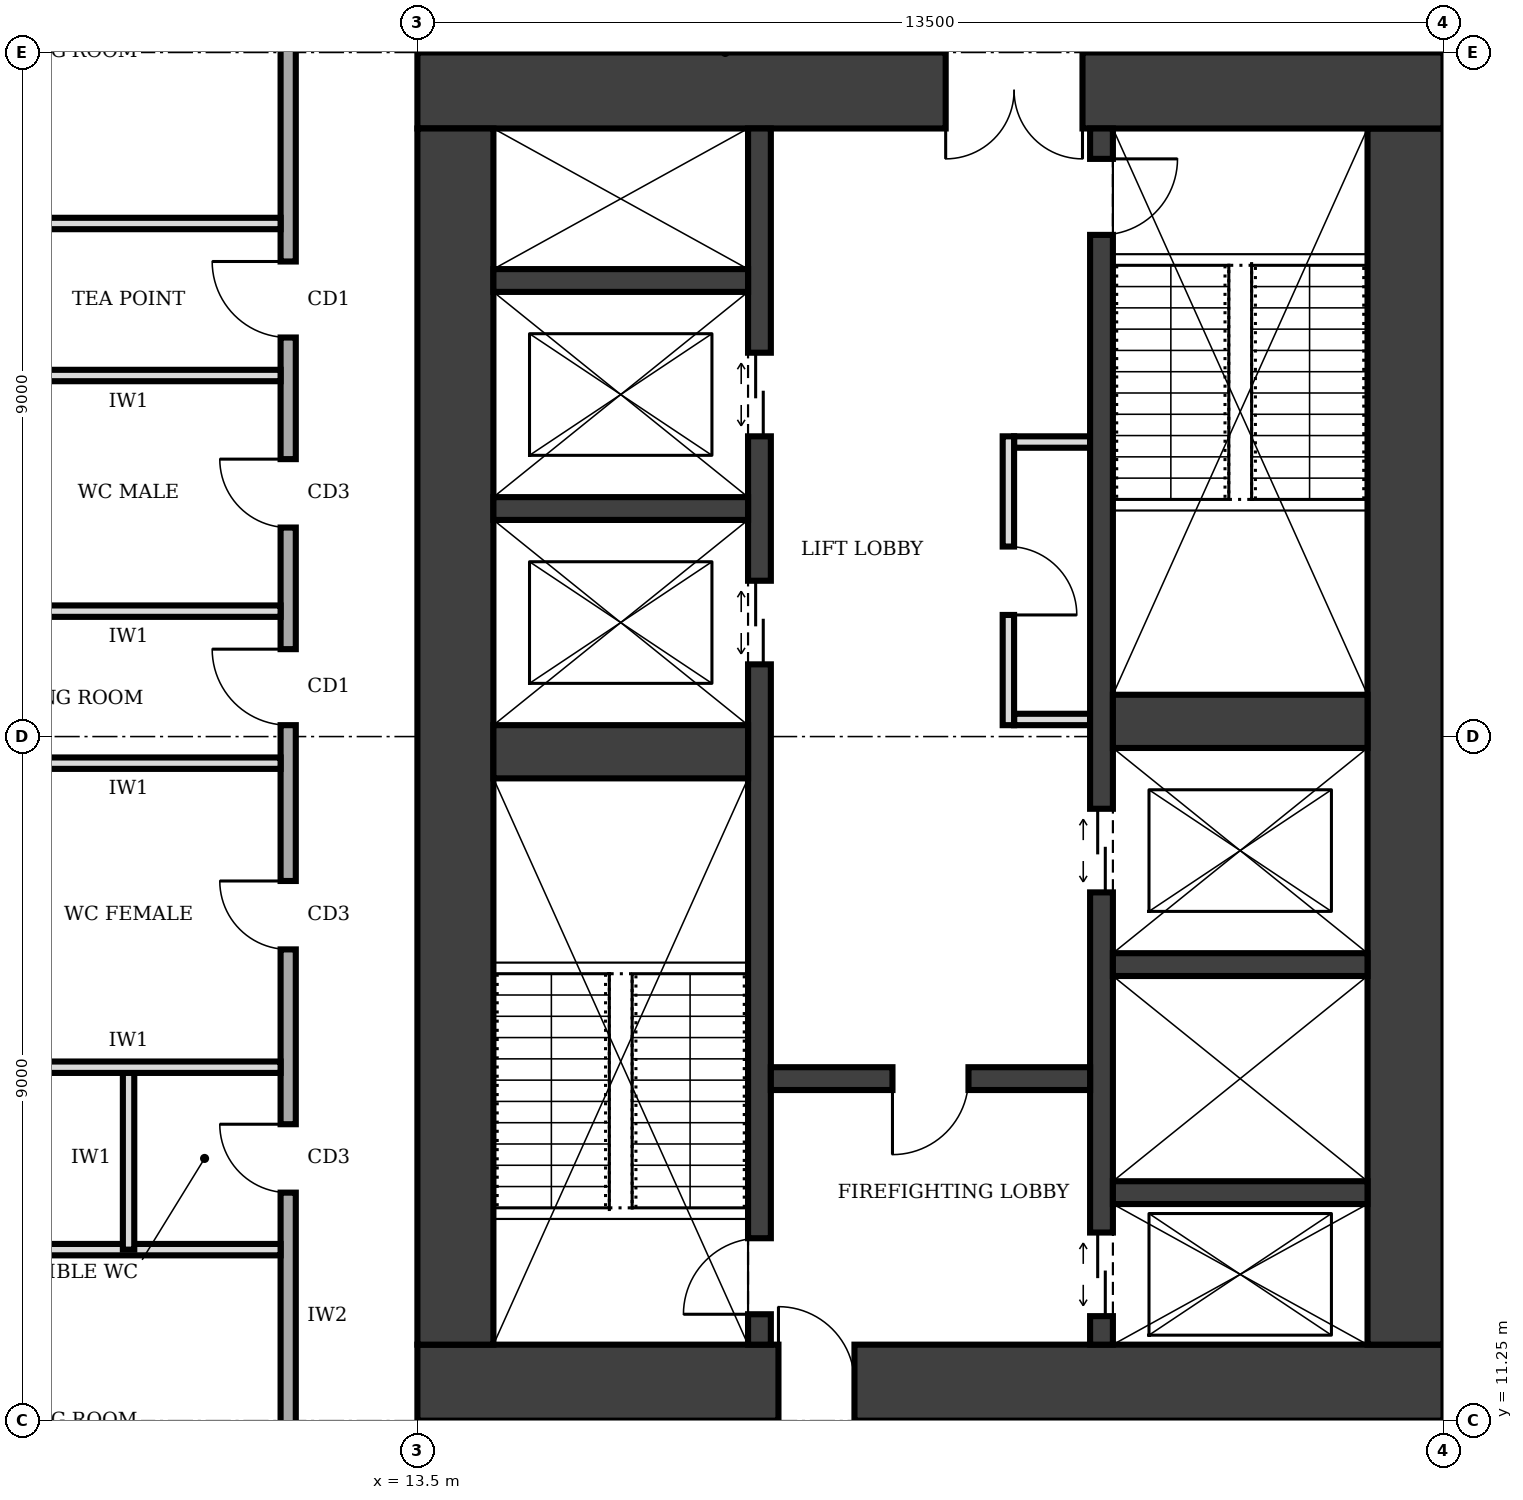
"""IFC4 building model, lengths in metres.
Left out: names, types, materials, properties, quantities, classifications, styles, units other than length and angle.
Written with IfcOpenShell. Run it as: python <this file> out.ifc"""

import sys

from ifc_helpers import new_model, si_unit, direction, frame, frame_2d, origin, place, context, subcontext, project, spatial, rectangle, extrude, element, fill, save


model = new_model("IFC4")
c1 = context("Model", 3, precision=1e-05, world=origin(), true_north=direction((0.0, 1.0)))
c2 = subcontext(c1, "Body", "Model", "MODEL_VIEW")
j1 = project(units=[si_unit("LENGTHUNIT", "METRE"), si_unit("PLANEANGLEUNIT", "RADIAN")], contexts=[c1])
p1 = place(None, origin())
s1 = spatial("IfcSite", under=j1, at=p1, CompositionType="ELEMENT")
p2 = place(p1, origin())
s2 = spatial("IfcBuilding", under=s1, at=p2, CompositionType="ELEMENT")
p3 = place(p2, frame((0.0, 0.0, 73.0)))
s3 = spatial("IfcBuildingStorey", under=s2, at=p3, CompositionType="ELEMENT", Elevation=73.0)
p4 = place(p3, frame((13.5, 11.75, 0.0), z_axis=(0.0, 0.0, 1.0), x_axis=(1.0, 0.0, 0.0)))
e1 = element("IfcWall", 1, at=p4, inside=s3, PredefinedType="SHEAR", context=c2, shape_type="SweptSolid", body=[
    extrude(rectangle(XDim=13.5, YDim=1.0, at=frame_2d((6.75, 0.0))), origin(), (0.0, 0.0, 1.0), 4.0),
])
p5 = place(p4, frame((4.75, 0.0, 0.0)))
e2 = element("IfcOpeningElement", 2, at=p5, cuts=e1, PredefinedType="OPENING", context=c2, shape_type="SweptSolid", body=[
    extrude(rectangle(XDim=1.0, YDim=2.1, at=frame_2d((0.5, 1.05))), frame((0.0, 0.51, 0.0), z_axis=(0.0, -1.0, 0.0), x_axis=(1.0, 0.0, 0.0)), (0.0, 0.0, 1.0), 1.02),
])
p6 = place(p3, frame((26.5, 12.25, 0.0), z_axis=(0.0, 0.0, 1.0), x_axis=(0.0, 1.0, 0.0)))
e3 = element("IfcWall", 3, at=p6, inside=s3, PredefinedType="SHEAR", context=c2, shape_type="SweptSolid", body=[
    extrude(rectangle(XDim=16.0, YDim=1.0, at=frame_2d((8.0, 0.0))), origin(), (0.0, 0.0, 1.0), 4.0),
])
p7 = place(p3, frame((27.0, 28.75, 0.0), z_axis=(0.0, 0.0, 1.0), x_axis=(-1.0, 0.0, 0.0)))
e4 = element("IfcWall", 4, at=p7, inside=s3, PredefinedType="SHEAR", context=c2, shape_type="SweptSolid", body=[
    extrude(rectangle(XDim=13.5, YDim=1.0, at=frame_2d((6.75, 0.0))), origin(), (0.0, 0.0, 1.0), 4.0),
])
p8 = place(p7, frame((4.75, 0.0, 0.0)))
e5 = element("IfcOpeningElement", 5, at=p8, cuts=e4, PredefinedType="OPENING", context=c2, shape_type="SweptSolid", body=[
    extrude(rectangle(XDim=1.8, YDim=2.1, at=frame_2d((0.9, 1.05))), frame((0.0, 0.51, 0.0), z_axis=(0.0, -1.0, 0.0), x_axis=(1.0, 0.0, 0.0)), (0.0, 0.0, 1.0), 1.02),
])
p9 = place(p3, frame((14.0, 28.25, 0.0), z_axis=(0.0, 0.0, 1.0), x_axis=(0.0, -1.0, 0.0)))
e6 = element("IfcWall", 6, at=p9, inside=s3, PredefinedType="SHEAR", context=c2, shape_type="SweptSolid", body=[
    extrude(rectangle(XDim=16.0, YDim=1.0, at=frame_2d((8.0, 0.0))), origin(), (0.0, 0.0, 1.0), 4.0),
])
p10 = place(p3, frame((18.0, 12.25, 0.0), z_axis=(0.0, 0.0, 1.0), x_axis=(0.0, 1.0, 0.0)))
e7 = element("IfcWall", 7, at=p10, inside=s3, PredefinedType="SHEAR", context=c2, shape_type="SweptSolid", body=[
    extrude(rectangle(XDim=16.0, YDim=0.3, at=frame_2d((8.0, 0.0))), origin(), (0.0, 0.0, 1.0), 4.0),
])
p11 = place(p10, frame((0.4, 0.0, 0.0)))
e8 = element("IfcOpeningElement", 8, at=p11, cuts=e7, PredefinedType="OPENING", context=c2, shape_type="SweptSolid", body=[
    extrude(rectangle(XDim=1.0, YDim=2.1, at=frame_2d((0.5, 1.05))), frame((0.0, 0.16, 0.0), z_axis=(0.0, -1.0, 0.0), x_axis=(1.0, 0.0, 0.0)), (0.0, 0.0, 1.0), 0.32),
])
p12 = place(p10, frame((8.95, 0.0, 0.0)))
e9 = element("IfcOpeningElement", 9, at=p12, cuts=e7, PredefinedType="OPENING", context=c2, shape_type="SweptSolid", body=[
    extrude(rectangle(XDim=1.1, YDim=2.1, at=frame_2d((0.55, 1.05))), frame((0.0, 0.16, 0.0), z_axis=(0.0, -1.0, 0.0), x_axis=(1.0, 0.0, 0.0)), (0.0, 0.0, 1.0), 0.32),
])
p13 = place(p10, frame((11.95, 0.0, 0.0)))
e10 = element("IfcOpeningElement", 10, at=p13, cuts=e7, PredefinedType="OPENING", context=c2, shape_type="SweptSolid", body=[
    extrude(rectangle(XDim=1.1, YDim=2.1, at=frame_2d((0.55, 1.05))), frame((0.0, 0.16, 0.0), z_axis=(0.0, -1.0, 0.0), x_axis=(1.0, 0.0, 0.0)), (0.0, 0.0, 1.0), 0.32),
])
p14 = place(p3, frame((22.5, 12.25, 0.0), z_axis=(0.0, 0.0, 1.0), x_axis=(0.0, 1.0, 0.0)))
e11 = element("IfcWall", 11, at=p14, inside=s3, PredefinedType="SHEAR", context=c2, shape_type="SweptSolid", body=[
    extrude(rectangle(XDim=16.0, YDim=0.3, at=frame_2d((8.0, 0.0))), origin(), (0.0, 0.0, 1.0), 4.0),
])
p15 = place(p14, frame((14.6, 0.0, 0.0)))
e12 = element("IfcOpeningElement", 12, at=p15, cuts=e11, PredefinedType="OPENING", context=c2, shape_type="SweptSolid", body=[
    extrude(rectangle(XDim=1.0, YDim=2.1, at=frame_2d((0.5, 1.05))), frame((0.0, 0.16, 0.0), z_axis=(0.0, -1.0, 0.0), x_axis=(1.0, 0.0, 0.0)), (0.0, 0.0, 1.0), 0.32),
])
p16 = place(p14, frame((0.375, 0.0, 0.0)))
e13 = element("IfcOpeningElement", 13, at=p16, cuts=e11, PredefinedType="OPENING", context=c2, shape_type="SweptSolid", body=[
    extrude(rectangle(XDim=1.1, YDim=2.1, at=frame_2d((0.55, 1.05))), frame((0.0, 0.16, 0.0), z_axis=(0.0, -1.0, 0.0), x_axis=(1.0, 0.0, 0.0)), (0.0, 0.0, 1.0), 0.32),
])
p17 = place(p14, frame((5.95, 0.0, 0.0)))
e14 = element("IfcOpeningElement", 14, at=p17, cuts=e11, PredefinedType="OPENING", context=c2, shape_type="SweptSolid", body=[
    extrude(rectangle(XDim=1.1, YDim=2.1, at=frame_2d((0.55, 1.05))), frame((0.0, 0.16, 0.0), z_axis=(0.0, -1.0, 0.0), x_axis=(1.0, 0.0, 0.0)), (0.0, 0.0, 1.0), 0.32),
])
p18 = place(p3, frame((14.5, 20.05, 0.0), z_axis=(0.0, 0.0, 1.0), x_axis=(1.0, 0.0, 0.0)))
e15 = element("IfcWall", 15, at=p18, inside=s3, PredefinedType="SHEAR", context=c2, shape_type="SweptSolid", body=[
    extrude(rectangle(XDim=3.35, YDim=0.7, at=frame_2d((1.675, 0.0))), origin(), (0.0, 0.0, 1.0), 4.0),
])
p19 = place(p3, frame((18.15, 15.75, 0.0), z_axis=(0.0, 0.0, 1.0), x_axis=(1.0, 0.0, 0.0)))
e16 = element("IfcWall", 16, at=p19, inside=s3, PredefinedType="SHEAR", context=c2, shape_type="SweptSolid", body=[
    extrude(rectangle(XDim=4.2, YDim=0.3, at=frame_2d((2.1, 0.0))), origin(), (0.0, 0.0, 1.0), 4.0),
])
p20 = place(p19, frame((1.6, 0.0, 0.0)))
e17 = element("IfcOpeningElement", 17, at=p20, cuts=e16, PredefinedType="OPENING", context=c2, shape_type="SweptSolid", body=[
    extrude(rectangle(XDim=1.0, YDim=2.1, at=frame_2d((0.5, 1.05))), frame((0.0, 0.16, 0.0), z_axis=(0.0, -1.0, 0.0), x_axis=(1.0, 0.0, 0.0)), (0.0, 0.0, 1.0), 0.32),
])
for number, where, z_axis, x_axis in (
    (18, (22.65, 14.25, 0.0), (0.0, 0.0, 1.0), (1.0, 0.0, 0.0)),
    (19, (22.65, 17.25, 0.0), (0.0, 0.0, 1.0), (1.0, 0.0, 0.0)),
):
    element("IfcWall", number, at=place(p3, frame(where, z_axis=z_axis, x_axis=x_axis)), inside=s3, PredefinedType="SHEAR", context=c2, shape_type="SweptSolid", body=[
        extrude(rectangle(XDim=3.35, YDim=0.3, at=frame_2d((1.675, 0.0))), origin(), (0.0, 0.0, 1.0), 4.0),
    ])
p21 = place(p3, frame((22.65, 20.45, 0.0), z_axis=(0.0, 0.0, 1.0), x_axis=(1.0, 0.0, 0.0)))
e20 = element("IfcWall", 20, at=p21, inside=s3, PredefinedType="SHEAR", context=c2, shape_type="SweptSolid", body=[
    extrude(rectangle(XDim=3.35, YDim=0.7, at=frame_2d((1.675, 0.0))), origin(), (0.0, 0.0, 1.0), 4.0),
])
for number, where, z_axis, x_axis in (
    (21, (14.5, 23.25, 0.0), (0.0, 0.0, 1.0), (1.0, 0.0, 0.0)),
    (22, (14.5, 26.25, 0.0), (0.0, 0.0, 1.0), (1.0, 0.0, 0.0)),
):
    element("IfcWall", number, at=place(p3, frame(where, z_axis=z_axis, x_axis=x_axis)), inside=s3, PredefinedType="SHEAR", context=c2, shape_type="SweptSolid", body=[
        extrude(rectangle(XDim=3.35, YDim=0.3, at=frame_2d((1.675, 0.0))), origin(), (0.0, 0.0, 1.0), 4.0),
    ])
p22 = place(p3, frame((21.275, 20.4, 0.0), z_axis=(0.0, 0.0, 1.0), x_axis=(0.0, 1.0, 0.0)))
e23 = element("IfcWall", 23, at=p22, inside=s3, PredefinedType="PARTITIONING", context=c2, shape_type="SweptSolid", body=[
    extrude(rectangle(XDim=3.8, YDim=0.15, at=frame_2d((1.9, 0.0))), origin(), (0.0, 0.0, 1.0), 3.75),
])
p23 = place(p22, frame((1.45, 0.0, 0.0)))
e24 = element("IfcOpeningElement", 24, at=p23, cuts=e23, PredefinedType="OPENING", context=c2, shape_type="SweptSolid", body=[
    extrude(rectangle(XDim=0.9, YDim=2.1, at=frame_2d((0.45, 1.05))), frame((0.0, 0.085, 0.0), z_axis=(0.0, -1.0, 0.0), x_axis=(1.0, 0.0, 0.0)), (0.0, 0.0, 1.0), 0.17),
])
for number, where, z_axis, x_axis in (
    (25, (21.35, 20.475, 0.0), (0.0, 0.0, 1.0), (1.0, 0.0, 0.0)),
    (26, (21.35, 24.125, 0.0), (0.0, 0.0, 1.0), (1.0, 0.0, 0.0)),
):
    element("IfcWall", number, at=place(p3, frame(where, z_axis=z_axis, x_axis=x_axis)), inside=s3, PredefinedType="PARTITIONING", context=c2, shape_type="SweptSolid", body=[
        extrude(rectangle(XDim=1.0, YDim=0.15, at=frame_2d((0.5, 0.0))), origin(), (0.0, 0.0, 1.0), 3.75),
    ])
p24 = place(p3, frame((11.8, 32.8, 0.0), z_axis=(0.0, 0.0, 1.0), x_axis=(0.0, -1.0, 0.0)))
e27 = element("IfcWall", 27, at=p24, inside=s3, PredefinedType="SOLIDWALL", context=c2, shape_type="SweptSolid", body=[
    extrude(rectangle(XDim=25.3, YDim=0.2, at=frame_2d((12.65, 0.0))), origin(), (0.0, 0.0, 1.0), 3.75),
])
p25 = place(p24, frame((21.8, 0.0, 0.0)))
e28 = element("IfcOpeningElement", 28, at=p25, cuts=e27, PredefinedType="OPENING", context=c2, shape_type="SweptSolid", body=[
    extrude(rectangle(XDim=1.0, YDim=2.1, at=frame_2d((0.5, 1.05))), frame((0.0, 0.11, 0.0), z_axis=(0.0, -1.0, 0.0), x_axis=(1.0, 0.0, 0.0)), (0.0, 0.0, 1.0), 0.22),
])
p26 = place(p24, frame((17.65, 0.0, 0.0)))
e29 = element("IfcOpeningElement", 29, at=p26, cuts=e27, PredefinedType="OPENING", context=c2, shape_type="SweptSolid", body=[
    extrude(rectangle(XDim=0.9, YDim=2.1, at=frame_2d((0.45, 1.05))), frame((0.0, 0.11, 0.0), z_axis=(0.0, -1.0, 0.0), x_axis=(1.0, 0.0, 0.0)), (0.0, 0.0, 1.0), 0.22),
])
p27 = place(p24, frame((14.45, 0.0, 0.0)))
e30 = element("IfcOpeningElement", 30, at=p27, cuts=e27, PredefinedType="OPENING", context=c2, shape_type="SweptSolid", body=[
    extrude(rectangle(XDim=0.9, YDim=2.1, at=frame_2d((0.45, 1.05))), frame((0.0, 0.11, 0.0), z_axis=(0.0, -1.0, 0.0), x_axis=(1.0, 0.0, 0.0)), (0.0, 0.0, 1.0), 0.22),
])
p28 = place(p24, frame((8.9, 0.0, 0.0)))
e31 = element("IfcOpeningElement", 31, at=p28, cuts=e27, PredefinedType="OPENING", context=c2, shape_type="SweptSolid", body=[
    extrude(rectangle(XDim=0.9, YDim=2.1, at=frame_2d((0.45, 1.05))), frame((0.0, 0.11, 0.0), z_axis=(0.0, -1.0, 0.0), x_axis=(1.0, 0.0, 0.0)), (0.0, 0.0, 1.0), 0.22),
])
p29 = place(p24, frame((6.3, 0.0, 0.0)))
e32 = element("IfcOpeningElement", 32, at=p29, cuts=e27, PredefinedType="OPENING", context=c2, shape_type="SweptSolid", body=[
    extrude(rectangle(XDim=1.0, YDim=2.1, at=frame_2d((0.5, 1.05))), frame((0.0, 0.11, 0.0), z_axis=(0.0, -1.0, 0.0), x_axis=(1.0, 0.0, 0.0)), (0.0, 0.0, 1.0), 0.22),
])
p30 = place(p24, frame((11.4, 0.0, 0.0)))
e33 = element("IfcOpeningElement", 33, at=p30, cuts=e27, PredefinedType="OPENING", context=c2, shape_type="SweptSolid", body=[
    extrude(rectangle(XDim=1.0, YDim=2.1, at=frame_2d((0.5, 1.05))), frame((0.0, 0.11, 0.0), z_axis=(0.0, -1.0, 0.0), x_axis=(1.0, 0.0, 0.0)), (0.0, 0.0, 1.0), 0.22),
])
p31 = place(p24, frame((2.3, 0.0, 0.0)))
e34 = element("IfcOpeningElement", 34, at=p31, cuts=e27, PredefinedType="OPENING", context=c2, shape_type="SweptSolid", body=[
    extrude(rectangle(XDim=1.0, YDim=2.1, at=frame_2d((0.5, 1.05))), frame((0.0, 0.11, 0.0), z_axis=(0.0, -1.0, 0.0), x_axis=(1.0, 0.0, 0.0)), (0.0, 0.0, 1.0), 0.22),
])
for number, where, z_axis, x_axis in (
    (35, (0.3, 13.5, 0.0), (0.0, 0.0, 1.0), (1.0, 0.0, 0.0)),
    (36, (0.3, 27.0, 0.0), (0.0, 0.0, 1.0), (1.0, 0.0, 0.0)),
):
    element("IfcWall", number, at=place(p3, frame(where, z_axis=z_axis, x_axis=x_axis)), inside=s3, PredefinedType="PARTITIONING", context=c2, shape_type="SweptSolid", body=[
        extrude(rectangle(XDim=11.4, YDim=0.15, at=frame_2d((5.7, 0.0))), origin(), (0.0, 0.0, 1.0), 3.75),
    ])
for number, where, z_axis, x_axis in (
    (37, (11.7, 15.9, 0.0), (0.0, 0.0, 1.0), (-1.0, 0.0, 0.0)),
    (38, (11.7, 19.9, 0.0), (0.0, 0.0, 1.0), (-1.0, 0.0, 0.0)),
    (39, (11.7, 21.9, 0.0), (0.0, 0.0, 1.0), (-1.0, 0.0, 0.0)),
    (40, (11.7, 25.0, 0.0), (0.0, 0.0, 1.0), (-1.0, 0.0, 0.0)),
):
    element("IfcWall", number, at=place(p3, frame(where, z_axis=z_axis, x_axis=x_axis)), inside=s3, PredefinedType="PARTITIONING", context=c2, shape_type="SweptSolid", body=[
        extrude(rectangle(XDim=4.0, YDim=0.15, at=frame_2d((2.0, 0.0))), origin(), (0.0, 0.0, 1.0), 3.75),
    ])
p32 = place(p3, frame((9.7, 13.5, 0.0), z_axis=(0.0, 0.0, 1.0), x_axis=(0.0, 1.0, 0.0)))
e41 = element("IfcWall", 41, at=p32, inside=s3, PredefinedType="PARTITIONING", context=c2, shape_type="SweptSolid", body=[
    extrude(rectangle(XDim=2.4, YDim=0.15, at=frame_2d((1.2, 0.0))), origin(), (0.0, 0.0, 1.0), 3.75),
])
p33 = place(p5, origin())
e42 = element("IfcDoor", 42, at=p33, inside=s3, OperationType="SINGLE_SWING_LEFT", PredefinedType="DOOR", context=c2, shape_type="SweptSolid", body=[
    extrude(rectangle(XDim=1.0, YDim=2.1, at=frame_2d((0.5, 1.05))), frame((0.0, 0.025, 0.0), z_axis=(0.0, -1.0, 0.0), x_axis=(1.0, 0.0, 0.0)), (0.0, 0.0, 1.0), 0.05),
])
fill(e2, e42)
p34 = place(p8, origin())
e43 = element("IfcDoor", 43, at=p34, inside=s3, OperationType="DOUBLE_DOOR_SINGLE_SWING", PredefinedType="DOOR", context=c2, shape_type="SweptSolid", body=[
    extrude(rectangle(XDim=1.8, YDim=2.1, at=frame_2d((0.9, 1.05))), frame((0.0, 0.025, 0.0), z_axis=(0.0, -1.0, 0.0), x_axis=(1.0, 0.0, 0.0)), (0.0, 0.0, 1.0), 0.05),
])
fill(e5, e43)
p35 = place(p20, frame((1.0, 0.0, 0.0), z_axis=(0.0, 0.0, 1.0), x_axis=(-1.0, 0.0, 0.0)))
e44 = element("IfcDoor", 44, at=p35, inside=s3, OperationType="SINGLE_SWING_RIGHT", PredefinedType="DOOR", context=c2, shape_type="SweptSolid", body=[
    extrude(rectangle(XDim=1.0, YDim=2.1, at=frame_2d((0.5, 1.05))), frame((0.0, 0.025, 0.0), z_axis=(0.0, -1.0, 0.0), x_axis=(1.0, 0.0, 0.0)), (0.0, 0.0, 1.0), 0.05),
])
fill(e17, e44)
p36 = place(p11, origin())
e45 = element("IfcDoor", 45, at=p36, inside=s3, OperationType="SINGLE_SWING_LEFT", PredefinedType="DOOR", context=c2, shape_type="SweptSolid", body=[
    extrude(rectangle(XDim=1.0, YDim=2.1, at=frame_2d((0.5, 1.05))), frame((0.0, 0.025, 0.0), z_axis=(0.0, -1.0, 0.0), x_axis=(1.0, 0.0, 0.0)), (0.0, 0.0, 1.0), 0.05),
])
fill(e8, e45)
p37 = place(p15, frame((1.0, 0.0, 0.0), z_axis=(0.0, 0.0, 1.0), x_axis=(-1.0, 0.0, 0.0)))
e46 = element("IfcDoor", 46, at=p37, inside=s3, OperationType="SINGLE_SWING_LEFT", PredefinedType="DOOR", context=c2, shape_type="SweptSolid", body=[
    extrude(rectangle(XDim=1.0, YDim=2.1, at=frame_2d((0.5, 1.05))), frame((0.0, 0.025, 0.0), z_axis=(0.0, -1.0, 0.0), x_axis=(1.0, 0.0, 0.0)), (0.0, 0.0, 1.0), 0.05),
])
fill(e12, e46)
p38 = place(p16, origin())
e47 = element("IfcDoor", 47, at=p38, inside=s3, OperationType="DOUBLE_DOOR_SLIDING", PredefinedType="DOOR", context=c2, shape_type="SweptSolid", body=[
    extrude(rectangle(XDim=1.1, YDim=2.1, at=frame_2d((0.55, 1.05))), frame((0.0, 0.025, 0.0), z_axis=(0.0, -1.0, 0.0), x_axis=(1.0, 0.0, 0.0)), (0.0, 0.0, 1.0), 0.05),
])
fill(e13, e47)
p39 = place(p12, origin())
e48 = element("IfcDoor", 48, at=p39, inside=s3, OperationType="DOUBLE_DOOR_SLIDING", PredefinedType="DOOR", context=c2, shape_type="SweptSolid", body=[
    extrude(rectangle(XDim=1.1, YDim=2.1, at=frame_2d((0.55, 1.05))), frame((0.0, 0.025, 0.0), z_axis=(0.0, -1.0, 0.0), x_axis=(1.0, 0.0, 0.0)), (0.0, 0.0, 1.0), 0.05),
])
fill(e9, e48)
p40 = place(p13, origin())
e49 = element("IfcDoor", 49, at=p40, inside=s3, OperationType="DOUBLE_DOOR_SLIDING", PredefinedType="DOOR", context=c2, shape_type="SweptSolid", body=[
    extrude(rectangle(XDim=1.1, YDim=2.1, at=frame_2d((0.55, 1.05))), frame((0.0, 0.025, 0.0), z_axis=(0.0, -1.0, 0.0), x_axis=(1.0, 0.0, 0.0)), (0.0, 0.0, 1.0), 0.05),
])
fill(e10, e49)
p41 = place(p17, origin())
e50 = element("IfcDoor", 50, at=p41, inside=s3, OperationType="DOUBLE_DOOR_SLIDING", PredefinedType="DOOR", context=c2, shape_type="SweptSolid", body=[
    extrude(rectangle(XDim=1.1, YDim=2.1, at=frame_2d((0.55, 1.05))), frame((0.0, 0.025, 0.0), z_axis=(0.0, -1.0, 0.0), x_axis=(1.0, 0.0, 0.0)), (0.0, 0.0, 1.0), 0.05),
])
fill(e14, e50)
p42 = place(p23, frame((0.9, 0.0, 0.0), z_axis=(0.0, 0.0, 1.0), x_axis=(-1.0, 0.0, 0.0)))
e51 = element("IfcDoor", 51, at=p42, inside=s3, OperationType="SINGLE_SWING_RIGHT", PredefinedType="DOOR", context=c2, shape_type="SweptSolid", body=[
    extrude(rectangle(XDim=0.9, YDim=2.1, at=frame_2d((0.45, 1.05))), frame((0.0, 0.025, 0.0), z_axis=(0.0, -1.0, 0.0), x_axis=(1.0, 0.0, 0.0)), (0.0, 0.0, 1.0), 0.05),
])
fill(e24, e51)
p43 = place(p26, frame((0.9, 0.0, 0.0), z_axis=(0.0, 0.0, 1.0), x_axis=(-1.0, 0.0, 0.0)))
e52 = element("IfcDoor", 52, at=p43, inside=s3, OperationType="SINGLE_SWING_RIGHT", PredefinedType="DOOR", context=c2, shape_type="SweptSolid", body=[
    extrude(rectangle(XDim=0.9, YDim=2.1, at=frame_2d((0.45, 1.05))), frame((0.0, 0.025, 0.0), z_axis=(0.0, -1.0, 0.0), x_axis=(1.0, 0.0, 0.0)), (0.0, 0.0, 1.0), 0.05),
])
fill(e29, e52)
p44 = place(p27, frame((0.9, 0.0, 0.0), z_axis=(0.0, 0.0, 1.0), x_axis=(-1.0, 0.0, 0.0)))
e53 = element("IfcDoor", 53, at=p44, inside=s3, OperationType="SINGLE_SWING_RIGHT", PredefinedType="DOOR", context=c2, shape_type="SweptSolid", body=[
    extrude(rectangle(XDim=0.9, YDim=2.1, at=frame_2d((0.45, 1.05))), frame((0.0, 0.025, 0.0), z_axis=(0.0, -1.0, 0.0), x_axis=(1.0, 0.0, 0.0)), (0.0, 0.0, 1.0), 0.05),
])
fill(e30, e53)
p45 = place(p28, frame((0.9, 0.0, 0.0), z_axis=(0.0, 0.0, 1.0), x_axis=(-1.0, 0.0, 0.0)))
e54 = element("IfcDoor", 54, at=p45, inside=s3, OperationType="SINGLE_SWING_RIGHT", PredefinedType="DOOR", context=c2, shape_type="SweptSolid", body=[
    extrude(rectangle(XDim=0.9, YDim=2.1, at=frame_2d((0.45, 1.05))), frame((0.0, 0.025, 0.0), z_axis=(0.0, -1.0, 0.0), x_axis=(1.0, 0.0, 0.0)), (0.0, 0.0, 1.0), 0.05),
])
fill(e31, e54)
p46 = place(p29, frame((1.0, 0.0, 0.0), z_axis=(0.0, 0.0, 1.0), x_axis=(-1.0, 0.0, 0.0)))
e55 = element("IfcDoor", 55, at=p46, inside=s3, OperationType="SINGLE_SWING_RIGHT", PredefinedType="DOOR", context=c2, shape_type="SweptSolid", body=[
    extrude(rectangle(XDim=1.0, YDim=2.1, at=frame_2d((0.5, 1.05))), frame((0.0, 0.025, 0.0), z_axis=(0.0, -1.0, 0.0), x_axis=(1.0, 0.0, 0.0)), (0.0, 0.0, 1.0), 0.05),
])
fill(e32, e55)
p47 = place(p30, frame((1.0, 0.0, 0.0), z_axis=(0.0, 0.0, 1.0), x_axis=(-1.0, 0.0, 0.0)))
e56 = element("IfcDoor", 56, at=p47, inside=s3, OperationType="SINGLE_SWING_RIGHT", PredefinedType="DOOR", context=c2, shape_type="SweptSolid", body=[
    extrude(rectangle(XDim=1.0, YDim=2.1, at=frame_2d((0.5, 1.05))), frame((0.0, 0.025, 0.0), z_axis=(0.0, -1.0, 0.0), x_axis=(1.0, 0.0, 0.0)), (0.0, 0.0, 1.0), 0.05),
])
fill(e33, e56)
save(model, sys.argv[1])
